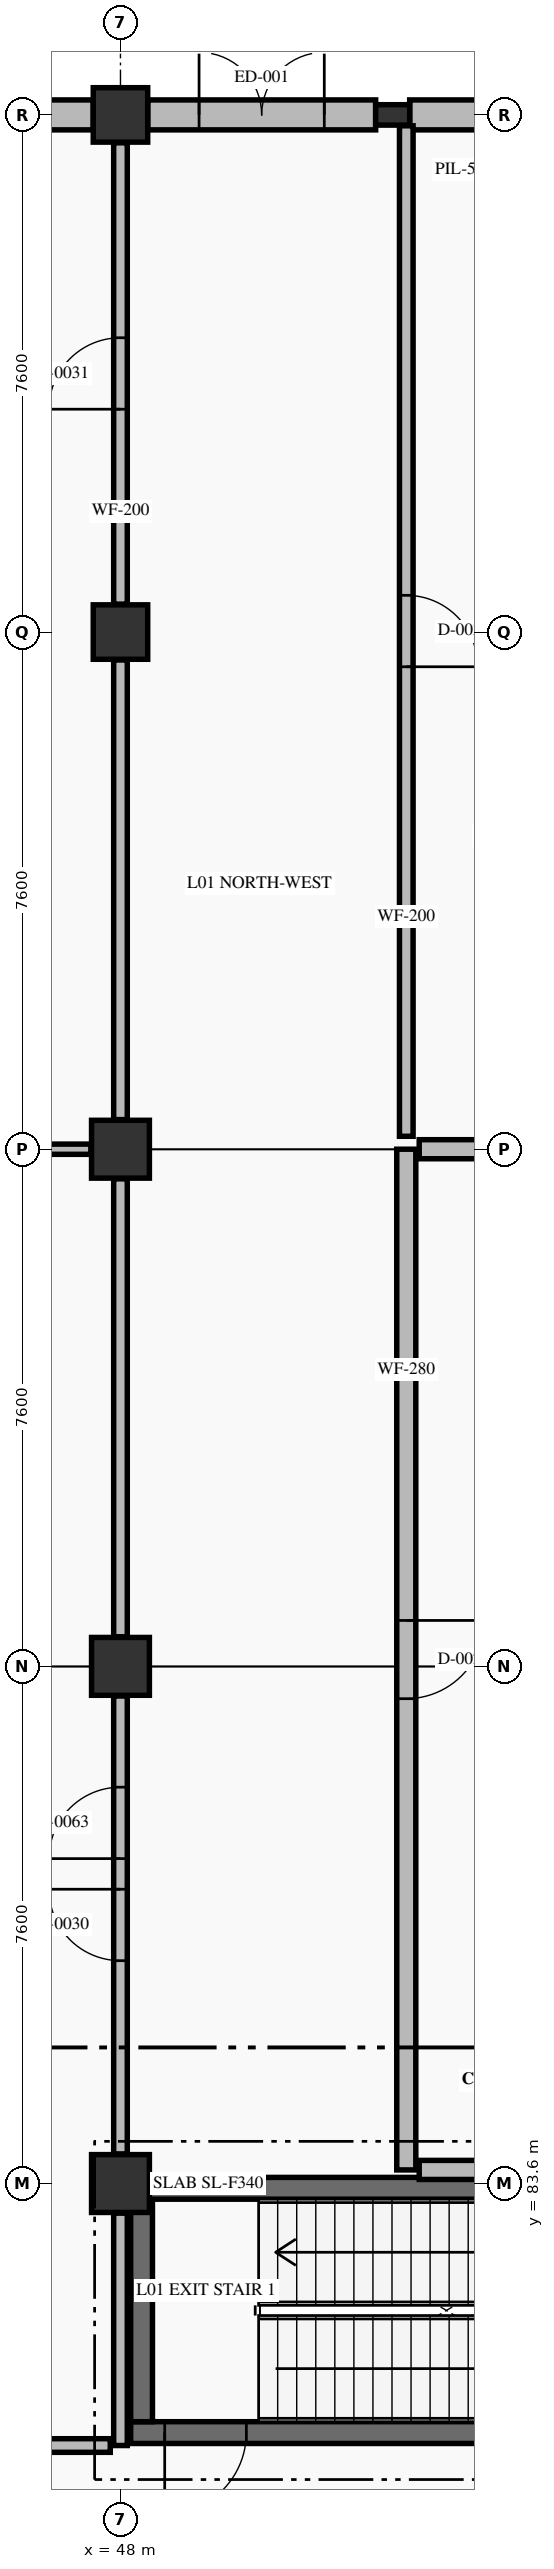
"""IFC4 building model, lengths in metres.
Left out: names, types, materials, properties, quantities, classifications, styles, units other than length and angle.
Written with IfcOpenShell. Run it as: python <this file> out.ifc"""

import sys

from ifc_helpers import new_model, si_unit, direction, frame, frame_2d, origin, origin_2d, place, context, subcontext, project, spatial, rectangle, extrude, element, fill, save


model = new_model("IFC4")
c1 = context("Model", 3, precision=1e-05, world=origin(), true_north=direction((0.0, 1.0)))
c2 = subcontext(c1, "Body", "Model", "MODEL_VIEW")
j1 = project(units=[si_unit("LENGTHUNIT", "METRE"), si_unit("PLANEANGLEUNIT", "RADIAN")], contexts=[c1])
p1 = place(None, origin())
s1 = spatial("IfcSite", under=j1, at=p1, CompositionType="ELEMENT")
p2 = place(p1, origin())
s2 = spatial("IfcBuilding", under=s1, at=p2, CompositionType="ELEMENT")
p3 = place(p2, origin())
s3 = spatial("IfcBuildingStorey", under=s2, at=p3, CompositionType="ELEMENT", Elevation=0.0)
for number, where, z_axis, x_axis in (
    (1, (48.0, 83.6, 0.0), (0.0, 0.0, 1.0), (1.0, 0.0, 0.0)),
    (2, (48.0, 91.2, 0.0), (0.0, 0.0, 1.0), (1.0, 0.0, 0.0)),
    (3, (48.0, 98.8, 0.0), (0.0, 0.0, 1.0), (1.0, 0.0, 0.0)),
):
    element("IfcColumn", number, at=place(p3, frame(where, z_axis=z_axis, x_axis=x_axis)), inside=s3, PredefinedType="COLUMN", context=c2, shape_type="SweptSolid", body=[
        extrude(rectangle(XDim=0.85, YDim=0.85, at=origin_2d()), origin(), (0.0, 0.0, 1.0), 5.4),
    ])
for number, where, z_axis, x_axis in (
    (4, (48.0, 106.4, 0.0), (0.0, 0.0, 1.0), (1.0, 0.0, 0.0)),
    (5, (48.0, 114.0, 0.0), (0.0, 0.0, 1.0), (1.0, 0.0, 0.0)),
):
    element("IfcColumn", number, at=place(p3, frame(where, z_axis=z_axis, x_axis=x_axis)), inside=s3, PredefinedType="COLUMN", context=c2, shape_type="SweptSolid", body=[
        extrude(rectangle(XDim=0.8, YDim=0.8, at=origin_2d()), origin(), (0.0, 0.0, 1.0), 5.4),
    ])
p4 = place(p3, frame((52.0, 114.0, 0.0), z_axis=(0.0, 0.0, 1.0), x_axis=(1.0, 0.0, 0.0)))
e6 = element("IfcColumn", 6, at=p4, inside=s3, PredefinedType="PILASTER", context=c2, shape_type="SweptSolid", body=[
    extrude(rectangle(XDim=0.5, YDim=0.3, at=origin_2d()), origin(), (0.0, 0.0, 1.0), 5.4),
])
p5 = place(p3, frame((44.275, 114.0, 0.0), z_axis=(0.0, 0.0, 1.0), x_axis=(1.0, 0.0, 0.0)))
e7 = element("IfcWall", 7, at=p5, inside=s3, PredefinedType="STANDARD", context=c2, shape_type="SweptSolid", body=[
    extrude(rectangle(XDim=3.325, YDim=0.44, at=frame_2d((1.663, 0.0))), origin(), (0.0, 0.0, 1.0), 4.56),
])
p6 = place(p5, frame((1.087, 0.0, 1.05)))
e8 = element("IfcOpeningElement", 8, at=p6, cuts=e7, PredefinedType="OPENING", context=c2, shape_type="SweptSolid", body=[
    extrude(rectangle(XDim=1.15, YDim=1.65, at=frame_2d((0.575, 0.825))), frame((0.0, 0.23, 0.0), z_axis=(0.0, -1.0, 0.0), x_axis=(1.0, 0.0, 0.0)), (0.0, 0.0, 1.0), 0.46),
])
p7 = place(p3, frame((48.4, 114.0, 0.0), z_axis=(0.0, 0.0, 1.0), x_axis=(1.0, 0.0, 0.0)))
e9 = element("IfcWall", 9, at=p7, inside=s3, PredefinedType="STANDARD", context=c2, shape_type="SweptSolid", body=[
    extrude(rectangle(XDim=3.35, YDim=0.44, at=frame_2d((1.675, 0.0))), origin(), (0.0, 0.0, 1.0), 4.56),
])
p8 = place(p7, frame((0.755, 0.0, 0.0)))
e10 = element("IfcOpeningElement", 10, at=p8, cuts=e9, PredefinedType="OPENING", context=c2, shape_type="SweptSolid", body=[
    extrude(rectangle(XDim=1.84, YDim=2.32, at=frame_2d((0.92, 1.16))), frame((0.0, 0.23, 0.0), z_axis=(0.0, -1.0, 0.0), x_axis=(1.0, 0.0, 0.0)), (0.0, 0.0, 1.0), 0.46),
])
p9 = place(p3, frame((52.25, 114.0, 0.0), z_axis=(0.0, 0.0, 1.0), x_axis=(1.0, 0.0, 0.0)))
e11 = element("IfcWall", 11, at=p9, inside=s3, PredefinedType="STANDARD", context=c2, shape_type="SweptSolid", body=[
    extrude(rectangle(XDim=3.35, YDim=0.44, at=frame_2d((1.675, 0.0))), origin(), (0.0, 0.0, 1.0), 4.56),
])
p10 = place(p9, frame((1.1, 0.0, 1.05)))
e12 = element("IfcOpeningElement", 12, at=p10, cuts=e11, PredefinedType="OPENING", context=c2, shape_type="SweptSolid", body=[
    extrude(rectangle(XDim=1.15, YDim=1.65, at=frame_2d((0.575, 0.825))), frame((0.0, 0.23, 0.0), z_axis=(0.0, -1.0, 0.0), x_axis=(1.0, 0.0, 0.0)), (0.0, 0.0, 1.0), 0.46),
])
p11 = place(p3, frame((55.85, 79.94, 0.0), z_axis=(0.0, 0.0, 1.0), x_axis=(-1.0, 0.0, 0.0)))
e13 = element("IfcWall", 13, at=p11, inside=s3, PredefinedType="SHEAR", context=c2, shape_type="SweptSolid", body=[
    extrude(rectangle(XDim=7.7, YDim=0.32, at=frame_2d((3.85, 0.0))), origin(), (0.0, 0.0, 1.0), 5.4),
])
p12 = place(p11, frame((6.0, 0.0, 0.0)))
e14 = element("IfcOpeningElement", 14, at=p12, cuts=e13, PredefinedType="OPENING", context=c2, shape_type="SweptSolid", body=[
    extrude(rectangle(XDim=1.2, YDim=2.2, at=frame_2d((0.6, 1.1))), frame((0.0, 0.17, 0.0), z_axis=(0.0, -1.0, 0.0), x_axis=(1.0, 0.0, 0.0)), (0.0, 0.0, 1.0), 0.34),
])
p13 = place(p3, frame((48.31, 80.1, 0.0), z_axis=(0.0, 0.0, 1.0), x_axis=(0.0, 1.0, 0.0)))
e15 = element("IfcWall", 15, at=p13, inside=s3, PredefinedType="SHEAR", context=c2, shape_type="SweptSolid", body=[
    extrude(rectangle(XDim=3.27, YDim=0.32, at=frame_2d((1.635, 0.0))), origin(), (0.0, 0.0, 1.0), 5.4),
])
p14 = place(p3, frame((48.15, 83.53, 0.0), z_axis=(0.0, 0.0, 1.0), x_axis=(1.0, 0.0, 0.0)))
e16 = element("IfcWall", 16, at=p14, inside=s3, PredefinedType="SHEAR", context=c2, shape_type="SweptSolid", body=[
    extrude(rectangle(XDim=7.7, YDim=0.32, at=frame_2d((3.85, 0.0))), origin(), (0.0, 0.0, 1.0), 5.4),
])
p15 = place(p3, frame((52.2, 98.8, 0.0), z_axis=(0.0, 0.0, 1.0), x_axis=(0.0, -1.0, 0.0)))
e17 = element("IfcWall", 17, at=p15, inside=s3, PredefinedType="STANDARD", context=c2, shape_type="SweptSolid", body=[
    extrude(rectangle(XDim=15.0, YDim=0.28, at=frame_2d((7.5, 0.0))), origin(), (0.0, 0.0, 1.0), 4.66),
])
p16 = place(p15, frame((6.925, 0.0, 0.0)))
e18 = element("IfcOpeningElement", 18, at=p16, cuts=e17, PredefinedType="OPENING", context=c2, shape_type="SweptSolid", body=[
    extrude(rectangle(XDim=1.15, YDim=2.2, at=frame_2d((0.575, 1.1))), frame((0.0, 0.15, 0.0), z_axis=(0.0, -1.0, 0.0), x_axis=(1.0, 0.0, 0.0)), (0.0, 0.0, 1.0), 0.3),
])
p17 = place(p3, frame((48.0, 84.035, 0.0), z_axis=(0.0, 0.0, 1.0), x_axis=(0.0, 1.0, 0.0)))
e19 = element("IfcWall", 19, at=p17, inside=s3, PredefinedType="STANDARD", context=c2, shape_type="SweptSolid", body=[
    extrude(rectangle(XDim=6.73, YDim=0.2, at=frame_2d((3.365, 0.0))), origin(), (0.0, 0.0, 1.0), 4.46),
])
p18 = place(p17, frame((2.84, 0.0, 0.0)))
e20 = element("IfcOpeningElement", 20, at=p18, cuts=e19, PredefinedType="OPENING", context=c2, shape_type="SweptSolid", body=[
    extrude(rectangle(XDim=1.05, YDim=2.15, at=frame_2d((0.525, 1.075))), frame((0.0, 0.11, 0.0), z_axis=(0.0, -1.0, 0.0), x_axis=(1.0, 0.0, 0.0)), (0.0, 0.0, 1.0), 0.22),
])
p19 = place(p17, frame((4.34, 0.0, 0.0)))
e21 = element("IfcOpeningElement", 21, at=p19, cuts=e19, PredefinedType="OPENING", context=c2, shape_type="SweptSolid", body=[
    extrude(rectangle(XDim=1.05, YDim=2.15, at=frame_2d((0.525, 1.075))), frame((0.0, 0.11, 0.0), z_axis=(0.0, -1.0, 0.0), x_axis=(1.0, 0.0, 0.0)), (0.0, 0.0, 1.0), 0.22),
])
p20 = place(p3, frame((48.0, 91.635, 0.0), z_axis=(0.0, 0.0, 1.0), x_axis=(0.0, 1.0, 0.0)))
e22 = element("IfcWall", 22, at=p20, inside=s3, PredefinedType="STANDARD", context=c2, shape_type="SweptSolid", body=[
    extrude(rectangle(XDim=6.73, YDim=0.2, at=frame_2d((3.365, 0.0))), origin(), (0.0, 0.0, 1.0), 4.46),
])
p21 = place(p3, frame((48.0, 99.235, 0.0), z_axis=(0.0, 0.0, 1.0), x_axis=(0.0, 1.0, 0.0)))
e23 = element("IfcWall", 23, at=p21, inside=s3, PredefinedType="STANDARD", context=c2, shape_type="SweptSolid", body=[
    extrude(rectangle(XDim=6.755, YDim=0.2, at=frame_2d((3.377, 0.0))), origin(), (0.0, 0.0, 1.0), 4.46),
])
p22 = place(p3, frame((48.0, 106.81, 0.0), z_axis=(0.0, 0.0, 1.0), x_axis=(0.0, 1.0, 0.0)))
e24 = element("IfcWall", 24, at=p22, inside=s3, PredefinedType="STANDARD", context=c2, shape_type="SweptSolid", body=[
    extrude(rectangle(XDim=6.78, YDim=0.2, at=frame_2d((3.39, 0.0))), origin(), (0.0, 0.0, 1.0), 4.46),
])
p23 = place(p22, frame((2.865, 0.0, 0.0)))
e25 = element("IfcOpeningElement", 25, at=p23, cuts=e24, PredefinedType="OPENING", context=c2, shape_type="SweptSolid", body=[
    extrude(rectangle(XDim=1.05, YDim=2.15, at=frame_2d((0.525, 1.075))), frame((0.0, 0.11, 0.0), z_axis=(0.0, -1.0, 0.0), x_axis=(1.0, 0.0, 0.0)), (0.0, 0.0, 1.0), 0.22),
])
p24 = place(p3, frame((52.2, 113.84, 0.0), z_axis=(0.0, 0.0, 1.0), x_axis=(0.0, -1.0, 0.0)))
e26 = element("IfcWall", 26, at=p24, inside=s3, PredefinedType="STANDARD", context=c2, shape_type="SweptSolid", body=[
    extrude(rectangle(XDim=14.85, YDim=0.2, at=frame_2d((7.425, 0.0))), origin(), (0.0, 0.0, 1.0), 4.66),
])
p25 = place(p24, frame((6.9, 0.0, 0.0)))
e27 = element("IfcOpeningElement", 27, at=p25, cuts=e26, PredefinedType="OPENING", context=c2, shape_type="SweptSolid", body=[
    extrude(rectangle(XDim=1.05, YDim=2.15, at=frame_2d((0.525, 1.075))), frame((0.0, 0.11, 0.0), z_axis=(0.0, -1.0, 0.0), x_axis=(1.0, 0.0, 0.0)), (0.0, 0.0, 1.0), 0.22),
])
p26 = place(p3, frame((52.39, 83.8, 0.0), z_axis=(0.0, 0.0, 1.0), x_axis=(1.0, 0.0, 0.0)))
e28 = element("IfcWall", 28, at=p26, inside=s3, PredefinedType="STANDARD", context=c2, shape_type="SweptSolid", body=[
    extrude(rectangle(XDim=3.175, YDim=0.28, at=frame_2d((1.587, 0.0))), origin(), (0.0, 0.0, 1.0), 4.51),
])
p27 = place(p3, frame((48.0, 79.75, 0.0), z_axis=(0.0, 0.0, 1.0), x_axis=(0.0, 1.0, 0.0)))
e29 = element("IfcWall", 29, at=p27, inside=s3, PredefinedType="STANDARD", context=c2, shape_type="SweptSolid", body=[
    extrude(rectangle(XDim=3.415, YDim=0.2, at=frame_2d((1.708, 0.0))), origin(), (0.0, 0.0, 1.0), 4.46),
])
p28 = place(p3, frame((52.39, 98.8, 0.0), z_axis=(0.0, 0.0, 1.0), x_axis=(1.0, 0.0, 0.0)))
e30 = element("IfcWall", 30, at=p28, inside=s3, PredefinedType="STANDARD", context=c2, shape_type="SweptSolid", body=[
    extrude(rectangle(XDim=3.175, YDim=0.28, at=frame_2d((1.587, 0.0))), origin(), (0.0, 0.0, 1.0), 4.56),
])
p29 = place(p3, frame((40.435, 98.8, 0.0), z_axis=(0.0, 0.0, 1.0), x_axis=(1.0, 0.0, 0.0)))
e31 = element("IfcWall", 31, at=p29, inside=s3, PredefinedType="PARTITIONING", context=c2, shape_type="SweptSolid", body=[
    extrude(rectangle(XDim=7.13, YDim=0.15, at=frame_2d((3.565, 0.0))), origin(), (0.0, 0.0, 1.0), 4.56),
])
p30 = place(p3, frame((47.85, 79.75, 0.0), z_axis=(0.0, 0.0, 1.0), x_axis=(-1.0, 0.0, 0.0)))
e32 = element("IfcWall", 32, at=p30, inside=s3, PredefinedType="STANDARD", context=c2, shape_type="SweptSolid", body=[
    extrude(rectangle(XDim=28.195, YDim=0.2, at=frame_2d((14.098, 0.0))), origin(), (0.0, 0.0, 1.0), 5.16),
])
p31 = place(p30, frame((13.573, 0.0, 0.0)))
e33 = element("IfcOpeningElement", 33, at=p31, cuts=e32, PredefinedType="OPENING", context=c2, shape_type="SweptSolid", body=[
    extrude(rectangle(XDim=1.05, YDim=2.15, at=frame_2d((0.525, 1.075))), frame((0.0, 0.11, 0.0), z_axis=(0.0, -1.0, 0.0), x_axis=(1.0, 0.0, 0.0)), (0.0, 0.0, 1.0), 0.22),
])
p32 = place(p8, origin())
e34 = element("IfcDoor", 34, at=p32, inside=s3, OperationType="DOUBLE_DOOR_SINGLE_SWING", PredefinedType="DOOR", context=c2, shape_type="SweptSolid", body=[
    extrude(rectangle(XDim=1.84, YDim=2.32, at=frame_2d((0.92, 1.16))), frame((0.0, 0.025, 0.0), z_axis=(0.0, -1.0, 0.0), x_axis=(1.0, 0.0, 0.0)), (0.0, 0.0, 1.0), 0.05),
])
fill(e10, e34)
p33 = place(p12, origin())
e35 = element("IfcDoor", 35, at=p33, inside=s3, OperationType="SINGLE_SWING_RIGHT", PredefinedType="DOOR", context=c2, shape_type="SweptSolid", body=[
    extrude(rectangle(XDim=1.2, YDim=2.2, at=frame_2d((0.6, 1.1))), frame((0.0, 0.025, 0.0), z_axis=(0.0, -1.0, 0.0), x_axis=(1.0, 0.0, 0.0)), (0.0, 0.0, 1.0), 0.05),
])
fill(e14, e35)
p34 = place(p16, origin())
e36 = element("IfcDoor", 36, at=p34, inside=s3, OperationType="SINGLE_SWING_LEFT", PredefinedType="DOOR", context=c2, shape_type="SweptSolid", body=[
    extrude(rectangle(XDim=1.15, YDim=2.2, at=frame_2d((0.575, 1.1))), frame((0.0, 0.025, 0.0), z_axis=(0.0, -1.0, 0.0), x_axis=(1.0, 0.0, 0.0)), (0.0, 0.0, 1.0), 0.05),
])
fill(e18, e36)
p35 = place(p18, origin())
e37 = element("IfcDoor", 37, at=p35, inside=s3, OperationType="SINGLE_SWING_RIGHT", PredefinedType="DOOR", context=c2, shape_type="SweptSolid", body=[
    extrude(rectangle(XDim=1.05, YDim=2.15, at=frame_2d((0.525, 1.075))), frame((0.0, 0.025, 0.0), z_axis=(0.0, -1.0, 0.0), x_axis=(1.0, 0.0, 0.0)), (0.0, 0.0, 1.0), 0.05),
])
fill(e20, e37)
p36 = place(p23, origin())
e38 = element("IfcDoor", 38, at=p36, inside=s3, OperationType="SINGLE_SWING_LEFT", PredefinedType="DOOR", context=c2, shape_type="SweptSolid", body=[
    extrude(rectangle(XDim=1.05, YDim=2.15, at=frame_2d((0.525, 1.075))), frame((0.0, 0.025, 0.0), z_axis=(0.0, -1.0, 0.0), x_axis=(1.0, 0.0, 0.0)), (0.0, 0.0, 1.0), 0.05),
])
fill(e25, e38)
p37 = place(p25, origin())
e39 = element("IfcDoor", 39, at=p37, inside=s3, OperationType="SINGLE_SWING_RIGHT", PredefinedType="DOOR", context=c2, shape_type="SweptSolid", body=[
    extrude(rectangle(XDim=1.05, YDim=2.15, at=frame_2d((0.525, 1.075))), frame((0.0, 0.025, 0.0), z_axis=(0.0, -1.0, 0.0), x_axis=(1.0, 0.0, 0.0)), (0.0, 0.0, 1.0), 0.05),
])
fill(e27, e39)
p38 = place(p19, origin())
e40 = element("IfcDoor", 40, at=p38, inside=s3, OperationType="SINGLE_SWING_LEFT", PredefinedType="DOOR", context=c2, shape_type="SweptSolid", body=[
    extrude(rectangle(XDim=1.05, YDim=2.15, at=frame_2d((0.525, 1.075))), frame((0.0, 0.025, 0.0), z_axis=(0.0, -1.0, 0.0), x_axis=(1.0, 0.0, 0.0)), (0.0, 0.0, 1.0), 0.05),
])
fill(e21, e40)
save(model, sys.argv[1])
